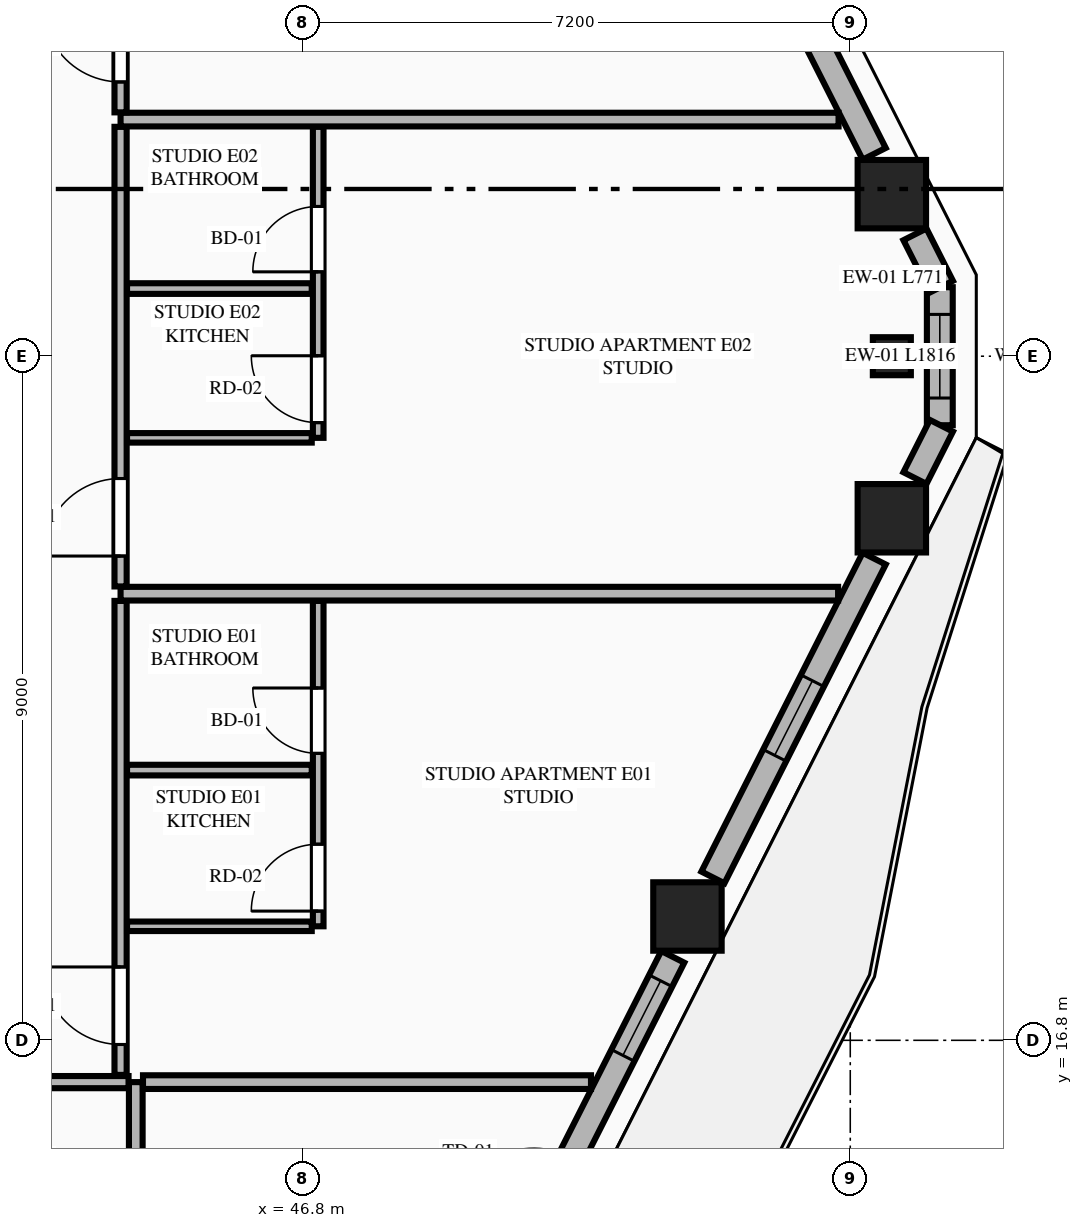
"""IFC4 building model, lengths in metres.
Left out: names, types, materials, properties, quantities, classifications, styles, units other than length and angle.
Written with IfcOpenShell. Run it as: python <this file> out.ifc"""

import sys

from ifc_helpers import new_model, si_unit, direction, frame, frame_2d, origin, origin_2d, place, context, subcontext, project, spatial, rectangle, extrude, element, fill, save


model = new_model("IFC4")
c1 = context("Model", 3, precision=1e-05, world=origin(), true_north=direction((0.0, 1.0)))
c2 = subcontext(c1, "Body", "Model", "MODEL_VIEW")
j1 = project(units=[si_unit("LENGTHUNIT", "METRE"), si_unit("PLANEANGLEUNIT", "RADIAN")], contexts=[c1])
p1 = place(None, origin())
s1 = spatial("IfcSite", under=j1, at=p1, CompositionType="ELEMENT")
p2 = place(p1, origin())
s2 = spatial("IfcBuilding", under=s1, at=p2, CompositionType="ELEMENT")
p3 = place(p2, frame((0.0, 0.0, 203.85)))
s3 = spatial("IfcBuildingStorey", under=s2, at=p3, CompositionType="ELEMENT", Elevation=203.85)
for number, where, z_axis, x_axis in (
    (1, (51.858, 18.429, 0.0), (0.0, 0.0, 1.0), (1.0, 0.0, 0.0)),
    (2, (54.547, 23.668, 0.0), (0.0, 0.0, 1.0), (1.0, 0.0, 0.0)),
    (3, (54.547, 27.932, 0.0), (0.0, 0.0, 1.0), (1.0, 0.0, 0.0)),
):
    element("IfcColumn", number, at=place(p3, frame(where, z_axis=z_axis, x_axis=x_axis)), inside=s3, PredefinedType="COLUMN", context=c2, shape_type="SweptSolid", body=[
        extrude(rectangle(XDim=0.9, YDim=0.9, at=origin_2d()), origin(), (0.0, 0.0, 1.0), 3.55),
    ])
p4 = place(p3, frame((54.547, 25.8, 0.0), z_axis=(0.0, 0.0, 1.0), x_axis=(0.0, 1.0, 0.0)))
e4 = element("IfcColumn", 4, at=p4, inside=s3, PredefinedType="PILASTER", context=c2, shape_type="SweptSolid", body=[
    extrude(rectangle(XDim=0.5, YDim=0.35, at=origin_2d()), origin(), (0.0, 0.0, 1.0), 3.55),
])
p5 = place(p3, frame((55.178, 24.892, 0.0), z_axis=(0.0, 0.0, 1.0), x_axis=(0.0, 1.0, 0.0)))
e5 = element("IfcWall", 5, at=p5, inside=s3, PredefinedType="STANDARD", context=c2, shape_type="SweptSolid", body=[
    extrude(rectangle(XDim=1.816, YDim=0.34, at=frame_2d((0.908, 0.0))), origin(), (0.0, 0.0, 1.0), 3.35),
])
p6 = place(p5, frame((0.358, 0.0, 0.75)))
e6 = element("IfcOpeningElement", 6, at=p6, cuts=e5, PredefinedType="OPENING", context=c2, shape_type="SweptSolid", body=[
    extrude(rectangle(XDim=1.1, YDim=2.0, at=frame_2d((0.55, 1.0))), frame((0.0, 0.18, 0.0), z_axis=(0.0, -1.0, 0.0), x_axis=(1.0, 0.0, 0.0)), (0.0, 0.0, 1.0), 0.36),
])
p7 = place(p3, frame((49.448, 13.517, 0.0), z_axis=(0.0, 0.0, 1.0), x_axis=(0.451544279509, 0.892248711763, 0.0)))
e7 = element("IfcWall", 7, at=p7, inside=s3, PredefinedType="STANDARD", context=c2, shape_type="SweptSolid", body=[
    extrude(rectangle(XDim=4.91, YDim=0.34, at=frame_2d((2.455, 0.0))), origin(), (0.0, 0.0, 1.0), 2.883),
])
p8 = place(p7, frame((0.856, 0.0, 0.0)))
e8 = element("IfcOpeningElement", 8, at=p8, cuts=e7, PredefinedType="OPENING", context=c2, shape_type="SweptSolid", body=[
    extrude(rectangle(XDim=1.1, YDim=2.25, at=frame_2d((0.55, 1.125))), frame((0.0, 0.18, 0.0), z_axis=(0.0, -1.0, 0.0), x_axis=(1.0, 0.0, 0.0)), (0.0, 0.0, 1.0), 0.36),
])
p9 = place(p7, frame((3.457, 0.0, 0.75)))
e9 = element("IfcOpeningElement", 9, at=p9, cuts=e7, PredefinedType="OPENING", context=c2, shape_type="SweptSolid", body=[
    extrude(rectangle(XDim=1.1, YDim=1.983, at=frame_2d((0.55, 0.991))), frame((0.0, 0.18, 0.0), z_axis=(0.0, -1.0, 0.0), x_axis=(1.0, 0.0, 0.0)), (0.0, 0.0, 1.0), 0.36),
])
p10 = place(p3, frame((52.193, 18.943, 0.0), z_axis=(0.0, 0.0, 1.0), x_axis=(0.451447222193, 0.892297823361, 0.0)))
e10 = element("IfcWall", 10, at=p10, inside=s3, PredefinedType="STANDARD", context=c2, shape_type="SweptSolid", body=[
    extrude(rectangle(XDim=4.7, YDim=0.34, at=frame_2d((2.35, 0.0))), origin(), (0.0, 0.0, 1.0), 2.883),
])
p11 = place(p10, frame((1.8, 0.0, 0.75)))
e11 = element("IfcOpeningElement", 11, at=p11, cuts=e10, PredefinedType="OPENING", context=c2, shape_type="SweptSolid", body=[
    extrude(rectangle(XDim=1.1, YDim=1.983, at=frame_2d((0.55, 0.991))), frame((0.0, 0.18, 0.0), z_axis=(0.0, -1.0, 0.0), x_axis=(1.0, 0.0, 0.0)), (0.0, 0.0, 1.0), 0.36),
])
for number, where, z_axis, x_axis in (
    (12, (54.851, 24.197, 0.0), (0.0, 0.0, 1.0), (0.451, 0.892, 0.0)),
    (13, (55.199, 26.715, 0.0), (0.0, 0.0, 1.0), (-0.451, 0.892, 0.0)),
):
    element("IfcWall", number, at=place(p3, frame(where, z_axis=z_axis, x_axis=x_axis)), inside=s3, PredefinedType="STANDARD", context=c2, shape_type="SweptSolid", body=[
        extrude(rectangle(XDim=0.771, YDim=0.34, at=frame_2d((0.385, 0.0))), origin(), (0.0, 0.0, 1.0), 3.35),
    ])
p12 = place(p3, frame((54.315, 28.463, 0.0), z_axis=(0.0, 0.0, 1.0), x_axis=(-0.451426298588, 0.892308409096, 0.0)))
e14 = element("IfcWall", 14, at=p12, inside=s3, PredefinedType="STANDARD", context=c2, shape_type="SweptSolid", body=[
    extrude(rectangle(XDim=4.7, YDim=0.34, at=frame_2d((2.35, 0.0))), origin(), (0.0, 0.0, 1.0), 2.883),
])
p13 = place(p12, frame((1.725, 0.0, 0.75)))
e15 = element("IfcOpeningElement", 15, at=p13, cuts=e14, PredefinedType="OPENING", context=c2, shape_type="SweptSolid", body=[
    extrude(rectangle(XDim=1.25, YDim=1.95, at=frame_2d((0.625, 0.975))), frame((0.0, 0.18, 0.0), z_axis=(0.0, -1.0, 0.0), x_axis=(1.0, 0.0, 0.0)), (0.0, 0.0, 1.0), 0.36),
])
p14 = place(p3, frame((44.6, 5.968, 0.0), z_axis=(0.0, 0.0, 1.0), x_axis=(0.0, 1.0, 0.0)))
e16 = element("IfcWall", 16, at=p14, inside=s3, PredefinedType="PARTITIONING", context=c2, shape_type="SweptSolid", body=[
    extrude(rectangle(XDim=10.282, YDim=0.18, at=frame_2d((5.141, 0.0))), origin(), (0.0, 0.0, 1.0), 3.35),
])
p15 = place(p3, frame((36.038, 16.25, 0.0), z_axis=(0.0, 0.0, 1.0), x_axis=(1.0, 0.0, 0.0)))
e17 = element("IfcWall", 17, at=p15, inside=s3, PredefinedType="PARTITIONING", context=c2, shape_type="SweptSolid", body=[
    extrude(rectangle(XDim=8.467, YDim=0.16, at=frame_2d((4.233, 0.0))), origin(), (0.0, 0.0, 1.0), 3.35),
])
p16 = place(p15, frame((0.355, 0.0, 0.0)))
e18 = element("IfcOpeningElement", 18, at=p16, cuts=e17, PredefinedType="OPENING", context=c2, shape_type="SweptSolid", body=[
    extrude(rectangle(XDim=1.02, YDim=2.25, at=frame_2d((0.51, 1.125))), frame((0.0, 0.09, 0.0), z_axis=(0.0, -1.0, 0.0), x_axis=(1.0, 0.0, 0.0)), (0.0, 0.0, 1.0), 0.18),
])
p17 = place(p3, frame((44.695, 16.25, 0.0), z_axis=(0.0, 0.0, 1.0), x_axis=(1.0, 0.0, 0.0)))
e19 = element("IfcWall", 19, at=p17, inside=s3, PredefinedType="PARTITIONING", context=c2, shape_type="SweptSolid", body=[
    extrude(rectangle(XDim=5.894, YDim=0.18, at=frame_2d((2.947, 0.0))), origin(), (0.0, 0.0, 1.0), 3.35),
])
p18 = place(p3, frame((44.4, 16.345, 0.0), z_axis=(0.0, 0.0, 1.0), x_axis=(0.0, 1.0, 0.0)))
e20 = element("IfcWall", 20, at=p18, inside=s3, PredefinedType="PARTITIONING", context=c2, shape_type="SweptSolid", body=[
    extrude(rectangle(XDim=6.236, YDim=0.16, at=frame_2d((3.118, 0.0))), origin(), (0.0, 0.0, 1.0), 3.35),
])
p19 = place(p18, frame((0.4, 0.0, 0.0)))
e21 = element("IfcOpeningElement", 21, at=p19, cuts=e20, PredefinedType="OPENING", context=c2, shape_type="SweptSolid", body=[
    extrude(rectangle(XDim=1.02, YDim=2.25, at=frame_2d((0.51, 1.125))), frame((0.0, 0.09, 0.0), z_axis=(0.0, -1.0, 0.0), x_axis=(1.0, 0.0, 0.0)), (0.0, 0.0, 1.0), 0.18),
])
p20 = place(p3, frame((44.485, 18.3, 0.0), z_axis=(0.0, 0.0, 1.0), x_axis=(1.0, 0.0, 0.0)))
e22 = element("IfcWall", 22, at=p20, inside=s3, PredefinedType="PARTITIONING", context=c2, shape_type="SweptSolid", body=[
    extrude(rectangle(XDim=2.43, YDim=0.125, at=frame_2d((1.215, 0.0))), origin(), (0.0, 0.0, 1.0), 2.807),
])
p21 = place(p3, frame((47.0, 18.3, 0.0), z_axis=(0.0, 0.0, 1.0), x_axis=(0.0, 1.0, 0.0)))
e23 = element("IfcWall", 23, at=p21, inside=s3, PredefinedType="PLUMBINGWALL", context=c2, shape_type="SweptSolid", body=[
    extrude(rectangle(XDim=4.281, YDim=0.14, at=frame_2d((2.141, 0.0))), origin(), (0.0, 0.0, 1.0), 3.35),
])
p22 = place(p21, frame((2.275, 0.0, 0.0)))
e24 = element("IfcOpeningElement", 24, at=p22, cuts=e23, PredefinedType="OPENING", context=c2, shape_type="SweptSolid", body=[
    extrude(rectangle(XDim=0.86, YDim=2.1, at=frame_2d((0.43, 1.05))), frame((0.0, 0.08, 0.0), z_axis=(0.0, -1.0, 0.0), x_axis=(1.0, 0.0, 0.0)), (0.0, 0.0, 1.0), 0.16),
])
p23 = place(p21, frame((0.2, 0.0, 0.0)))
e25 = element("IfcOpeningElement", 25, at=p23, cuts=e23, PredefinedType="OPENING", context=c2, shape_type="SweptSolid", body=[
    extrude(rectangle(XDim=0.88, YDim=2.15, at=frame_2d((0.44, 1.075))), frame((0.0, 0.08, 0.0), z_axis=(0.0, -1.0, 0.0), x_axis=(1.0, 0.0, 0.0)), (0.0, 0.0, 1.0), 0.16),
])
p24 = place(p3, frame((44.485, 20.355, 0.0), z_axis=(0.0, 0.0, 1.0), x_axis=(1.0, 0.0, 0.0)))
e26 = element("IfcWall", 26, at=p24, inside=s3, PredefinedType="PLUMBINGWALL", context=c2, shape_type="SweptSolid", body=[
    extrude(rectangle(XDim=2.43, YDim=0.14, at=frame_2d((1.215, 0.0))), origin(), (0.0, 0.0, 1.0), 3.35),
])
p25 = place(p3, frame((44.4, 22.676, 0.0), z_axis=(0.0, 0.0, 1.0), x_axis=(1.0, 0.0, 0.0)))
e27 = element("IfcWall", 27, at=p25, inside=s3, PredefinedType="PARTITIONING", context=c2, shape_type="SweptSolid", body=[
    extrude(rectangle(XDim=9.44, YDim=0.18, at=frame_2d((4.72, 0.0))), origin(), (0.0, 0.0, 1.0), 3.35),
])
p26 = place(p3, frame((44.4, 22.771, 0.0), z_axis=(0.0, 0.0, 1.0), x_axis=(0.0, 1.0, 0.0)))
e28 = element("IfcWall", 28, at=p26, inside=s3, PredefinedType="PARTITIONING", context=c2, shape_type="SweptSolid", body=[
    extrude(rectangle(XDim=6.047, YDim=0.16, at=frame_2d((3.023, 0.0))), origin(), (0.0, 0.0, 1.0), 3.35),
])
p27 = place(p26, frame((0.4, 0.0, 0.0)))
e29 = element("IfcOpeningElement", 29, at=p27, cuts=e28, PredefinedType="OPENING", context=c2, shape_type="SweptSolid", body=[
    extrude(rectangle(XDim=1.02, YDim=2.25, at=frame_2d((0.51, 1.125))), frame((0.0, 0.09, 0.0), z_axis=(0.0, -1.0, 0.0), x_axis=(1.0, 0.0, 0.0)), (0.0, 0.0, 1.0), 0.18),
])
p28 = place(p3, frame((44.485, 24.726, 0.0), z_axis=(0.0, 0.0, 1.0), x_axis=(1.0, 0.0, 0.0)))
e30 = element("IfcWall", 30, at=p28, inside=s3, PredefinedType="PARTITIONING", context=c2, shape_type="SweptSolid", body=[
    extrude(rectangle(XDim=2.43, YDim=0.125, at=frame_2d((1.215, 0.0))), origin(), (0.0, 0.0, 1.0), 3.35),
])
p29 = place(p3, frame((47.0, 24.726, 0.0), z_axis=(0.0, 0.0, 1.0), x_axis=(0.0, 1.0, 0.0)))
e31 = element("IfcWall", 31, at=p29, inside=s3, PredefinedType="PLUMBINGWALL", context=c2, shape_type="SweptSolid", body=[
    extrude(rectangle(XDim=4.092, YDim=0.14, at=frame_2d((2.046, 0.0))), origin(), (0.0, 0.0, 1.0), 3.35),
])
p30 = place(p29, frame((2.184, 0.0, 0.0)))
e32 = element("IfcOpeningElement", 32, at=p30, cuts=e31, PredefinedType="OPENING", context=c2, shape_type="SweptSolid", body=[
    extrude(rectangle(XDim=0.86, YDim=2.1, at=frame_2d((0.43, 1.05))), frame((0.0, 0.08, 0.0), z_axis=(0.0, -1.0, 0.0), x_axis=(1.0, 0.0, 0.0)), (0.0, 0.0, 1.0), 0.16),
])
p31 = place(p29, frame((0.2, 0.0, 0.0)))
e33 = element("IfcOpeningElement", 33, at=p31, cuts=e31, PredefinedType="OPENING", context=c2, shape_type="SweptSolid", body=[
    extrude(rectangle(XDim=0.88, YDim=2.15, at=frame_2d((0.44, 1.075))), frame((0.0, 0.08, 0.0), z_axis=(0.0, -1.0, 0.0), x_axis=(1.0, 0.0, 0.0)), (0.0, 0.0, 1.0), 0.16),
])
p32 = place(p3, frame((44.485, 26.69, 0.0), z_axis=(0.0, 0.0, 1.0), x_axis=(1.0, 0.0, 0.0)))
e34 = element("IfcWall", 34, at=p32, inside=s3, PredefinedType="PLUMBINGWALL", context=c2, shape_type="SweptSolid", body=[
    extrude(rectangle(XDim=2.43, YDim=0.14, at=frame_2d((1.215, 0.0))), origin(), (0.0, 0.0, 1.0), 3.35),
])
p33 = place(p3, frame((44.4, 28.913, 0.0), z_axis=(0.0, 0.0, 1.0), x_axis=(1.0, 0.0, 0.0)))
e35 = element("IfcWall", 35, at=p33, inside=s3, PredefinedType="PARTITIONING", context=c2, shape_type="SweptSolid", body=[
    extrude(rectangle(XDim=9.446, YDim=0.18, at=frame_2d((4.723, 0.0))), origin(), (0.0, 0.0, 1.0), 3.35),
])
p34 = place(p3, frame((44.4, 29.008, 0.0), z_axis=(0.0, 0.0, 1.0), x_axis=(0.0, 1.0, 0.0)))
e36 = element("IfcWall", 36, at=p34, inside=s3, PredefinedType="PARTITIONING", context=c2, shape_type="SweptSolid", body=[
    extrude(rectangle(XDim=6.047, YDim=0.16, at=frame_2d((3.023, 0.0))), origin(), (0.0, 0.0, 1.0), 3.35),
])
p35 = place(p34, frame((0.4, 0.0, 0.0)))
e37 = element("IfcOpeningElement", 37, at=p35, cuts=e36, PredefinedType="OPENING", context=c2, shape_type="SweptSolid", body=[
    extrude(rectangle(XDim=1.02, YDim=2.25, at=frame_2d((0.51, 1.125))), frame((0.0, 0.09, 0.0), z_axis=(0.0, -1.0, 0.0), x_axis=(1.0, 0.0, 0.0)), (0.0, 0.0, 1.0), 0.18),
])
p36 = place(p11, origin())
e38 = element("IfcWindow", 38, at=p36, inside=s3, PartitioningType="SINGLE_PANEL", PredefinedType="WINDOW", context=c2, shape_type="SweptSolid", body=[
    extrude(rectangle(XDim=1.1, YDim=1.983, at=frame_2d((0.55, 0.991))), frame((0.0, 0.03, 0.0), z_axis=(0.0, -1.0, 0.0), x_axis=(1.0, 0.0, 0.0)), (0.0, 0.0, 1.0), 0.06),
])
fill(e11, e38)
p37 = place(p22, origin())
e39 = element("IfcDoor", 39, at=p37, inside=s3, OperationType="SINGLE_SWING_RIGHT", PredefinedType="DOOR", context=c2, shape_type="SweptSolid", body=[
    extrude(rectangle(XDim=0.86, YDim=2.1, at=frame_2d((0.43, 1.05))), frame((0.0, 0.025, 0.0), z_axis=(0.0, -1.0, 0.0), x_axis=(1.0, 0.0, 0.0)), (0.0, 0.0, 1.0), 0.05),
])
fill(e24, e39)
p38 = place(p19, origin())
e40 = element("IfcDoor", 40, at=p38, inside=s3, OperationType="SINGLE_SWING_RIGHT", PredefinedType="DOOR", context=c2, shape_type="SweptSolid", body=[
    extrude(rectangle(XDim=1.02, YDim=2.25, at=frame_2d((0.51, 1.125))), frame((0.0, 0.025, 0.0), z_axis=(0.0, -1.0, 0.0), x_axis=(1.0, 0.0, 0.0)), (0.0, 0.0, 1.0), 0.05),
])
fill(e21, e40)
p39 = place(p23, origin())
e41 = element("IfcDoor", 41, at=p39, inside=s3, OperationType="SINGLE_SWING_LEFT", PredefinedType="DOOR", context=c2, shape_type="SweptSolid", body=[
    extrude(rectangle(XDim=0.88, YDim=2.15, at=frame_2d((0.44, 1.075))), frame((0.0, 0.025, 0.0), z_axis=(0.0, -1.0, 0.0), x_axis=(1.0, 0.0, 0.0)), (0.0, 0.0, 1.0), 0.05),
])
fill(e25, e41)
p40 = place(p30, origin())
e42 = element("IfcDoor", 42, at=p40, inside=s3, OperationType="SINGLE_SWING_LEFT", PredefinedType="DOOR", context=c2, shape_type="SweptSolid", body=[
    extrude(rectangle(XDim=0.86, YDim=2.1, at=frame_2d((0.43, 1.05))), frame((0.0, 0.025, 0.0), z_axis=(0.0, -1.0, 0.0), x_axis=(1.0, 0.0, 0.0)), (0.0, 0.0, 1.0), 0.05),
])
fill(e32, e42)
p41 = place(p27, origin())
e43 = element("IfcDoor", 43, at=p41, inside=s3, OperationType="SINGLE_SWING_LEFT", PredefinedType="DOOR", context=c2, shape_type="SweptSolid", body=[
    extrude(rectangle(XDim=1.02, YDim=2.25, at=frame_2d((0.51, 1.125))), frame((0.0, 0.025, 0.0), z_axis=(0.0, -1.0, 0.0), x_axis=(1.0, 0.0, 0.0)), (0.0, 0.0, 1.0), 0.05),
])
fill(e29, e43)
p42 = place(p31, origin())
e44 = element("IfcDoor", 44, at=p42, inside=s3, OperationType="SINGLE_SWING_RIGHT", PredefinedType="DOOR", context=c2, shape_type="SweptSolid", body=[
    extrude(rectangle(XDim=0.88, YDim=2.15, at=frame_2d((0.44, 1.075))), frame((0.0, 0.025, 0.0), z_axis=(0.0, -1.0, 0.0), x_axis=(1.0, 0.0, 0.0)), (0.0, 0.0, 1.0), 0.05),
])
fill(e33, e44)
p43 = place(p35, origin())
e45 = element("IfcDoor", 45, at=p43, inside=s3, OperationType="SINGLE_SWING_RIGHT", PredefinedType="DOOR", context=c2, shape_type="SweptSolid", body=[
    extrude(rectangle(XDim=1.02, YDim=2.25, at=frame_2d((0.51, 1.125))), frame((0.0, 0.025, 0.0), z_axis=(0.0, -1.0, 0.0), x_axis=(1.0, 0.0, 0.0)), (0.0, 0.0, 1.0), 0.05),
])
fill(e37, e45)
p44 = place(p9, origin())
e46 = element("IfcWindow", 46, at=p44, inside=s3, PartitioningType="SINGLE_PANEL", PredefinedType="WINDOW", context=c2, shape_type="SweptSolid", body=[
    extrude(rectangle(XDim=1.1, YDim=1.983, at=frame_2d((0.55, 0.991))), frame((0.0, 0.03, 0.0), z_axis=(0.0, -1.0, 0.0), x_axis=(1.0, 0.0, 0.0)), (0.0, 0.0, 1.0), 0.06),
])
fill(e9, e46)
p45 = place(p6, origin())
e47 = element("IfcWindow", 47, at=p45, inside=s3, PartitioningType="SINGLE_PANEL", PredefinedType="WINDOW", context=c2, shape_type="SweptSolid", body=[
    extrude(rectangle(XDim=1.1, YDim=2.0, at=frame_2d((0.55, 1.0))), frame((0.0, 0.03, 0.0), z_axis=(0.0, -1.0, 0.0), x_axis=(1.0, 0.0, 0.0)), (0.0, 0.0, 1.0), 0.06),
])
fill(e6, e47)
save(model, sys.argv[1])
